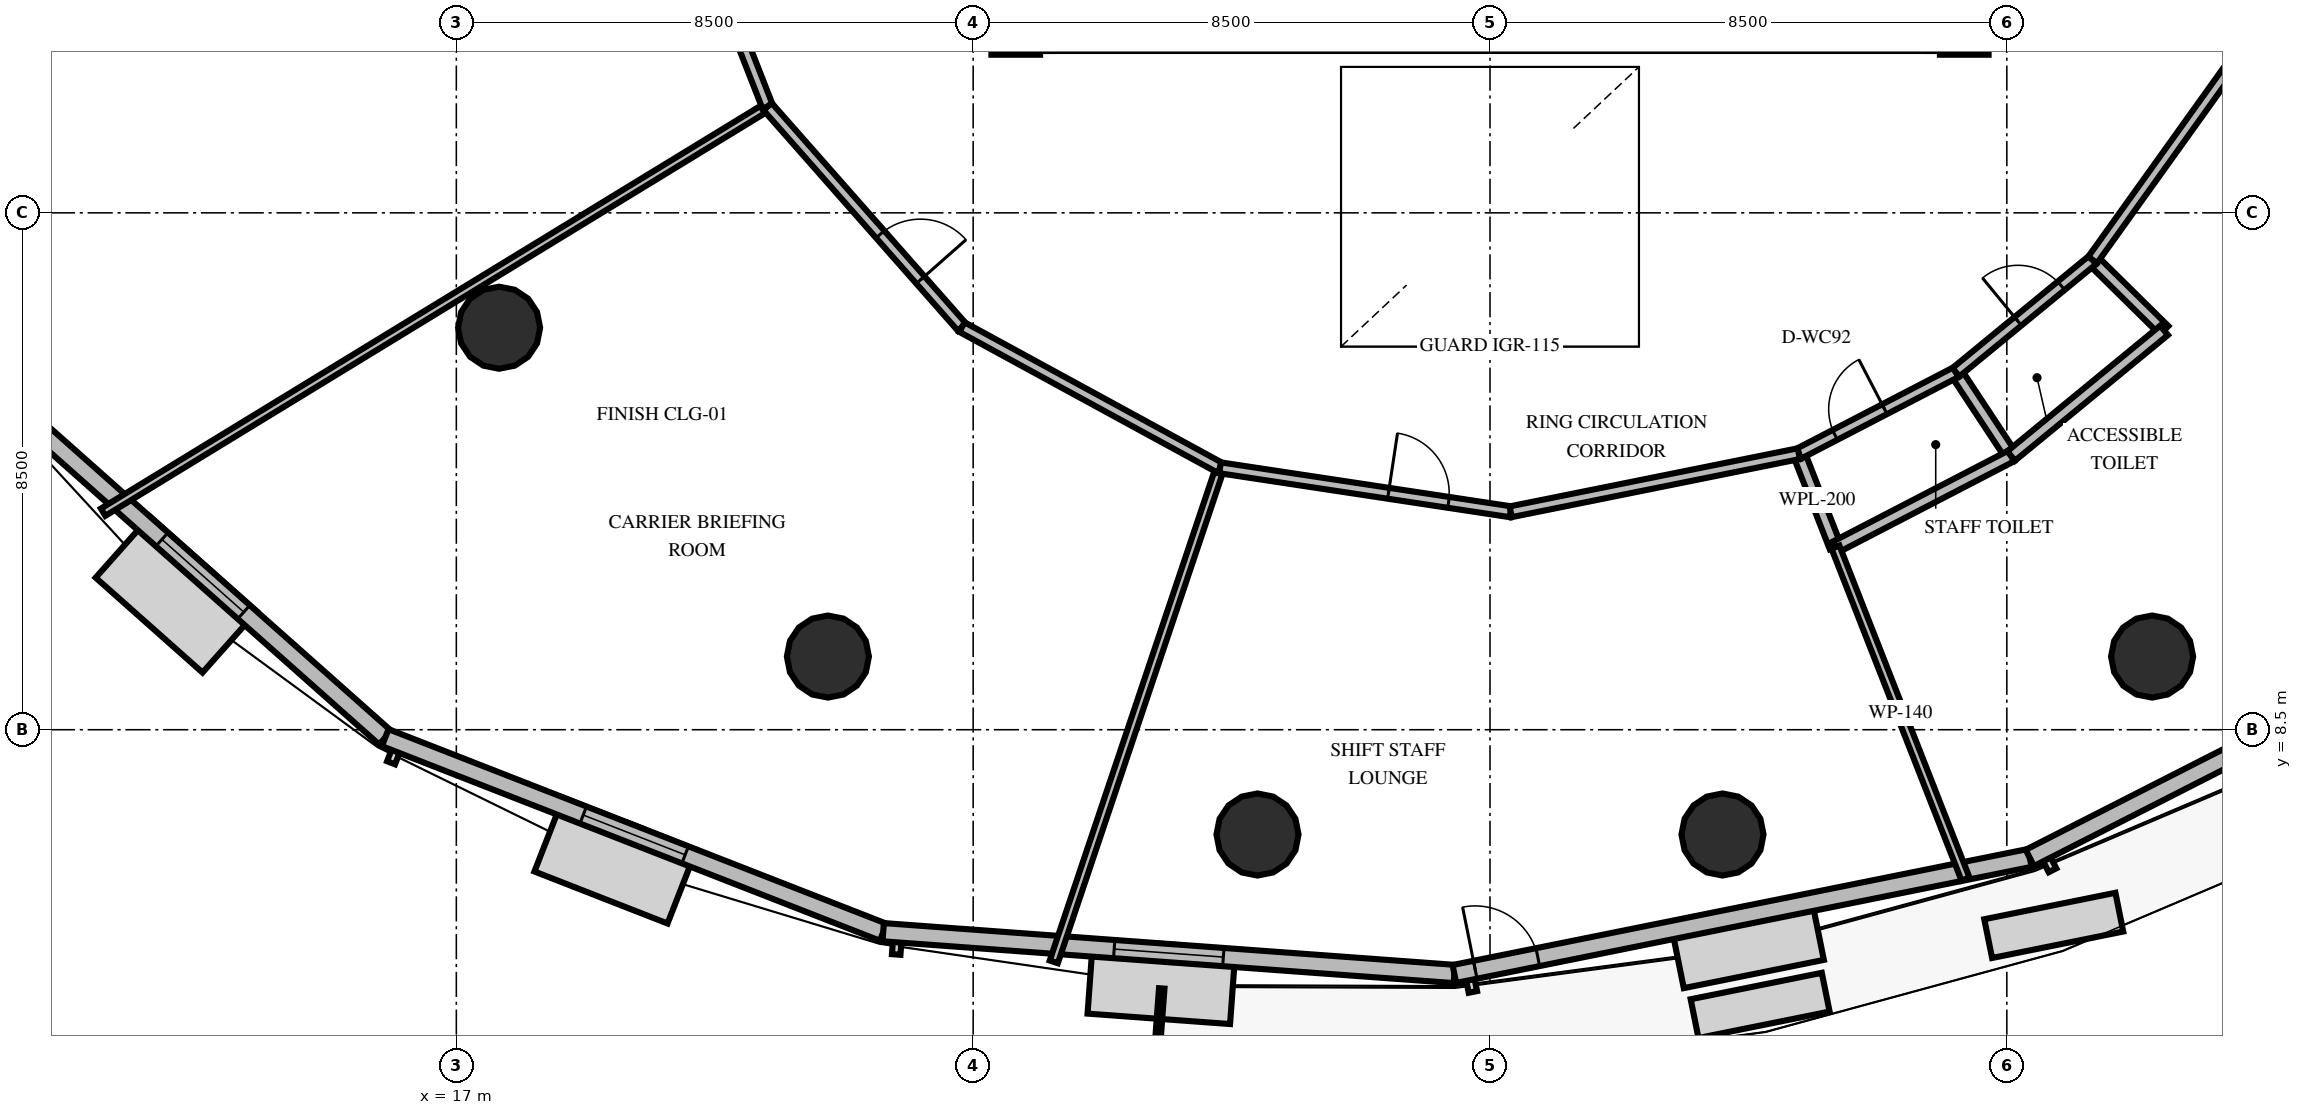
"""IFC4 building model, lengths in metres.
Left out: names, types, materials, properties, quantities, classifications, styles, units other than length and angle.
Written with IfcOpenShell. Run it as: python <this file> out.ifc"""

import sys

from ifc_helpers import new_model, si_unit, direction, frame, frame_2d, origin, origin_2d, place, context, subcontext, project, spatial, rectangle, circle, extrude, element, fill, save


model = new_model("IFC4")
c1 = context("Model", 3, precision=1e-05, world=origin(), true_north=direction((0.0, 1.0)))
c2 = subcontext(c1, "Body", "Model", "MODEL_VIEW")
j1 = project(units=[si_unit("LENGTHUNIT", "METRE"), si_unit("PLANEANGLEUNIT", "RADIAN")], contexts=[c1])
p1 = place(None, origin())
s1 = spatial("IfcSite", under=j1, at=p1, CompositionType="ELEMENT")
p2 = place(p1, origin())
s2 = spatial("IfcBuilding", under=s1, at=p2, CompositionType="ELEMENT")
p3 = place(p2, frame((0.0, 0.0, 80.4)))
s3 = spatial("IfcBuildingStorey", under=s2, at=p3, CompositionType="ELEMENT", Elevation=80.4)
for number, where, z_axis, x_axis in (
    (1, (26.2, 20.0, 0.0), (0.0, 0.0, 1.0), (1.0, 0.0, 0.0)),
    (2, (41.8, 20.0, 0.0), (0.0, 0.0, 1.0), (1.0, 0.0, 0.0)),
):
    element("IfcColumn", number, at=place(p3, frame(where, z_axis=z_axis, x_axis=x_axis)), inside=s3, PredefinedType="PILASTER", context=c2, shape_type="SweptSolid", body=[
        extrude(rectangle(XDim=0.8, YDim=0.8, at=origin_2d()), origin(), (0.0, 0.0, 1.0), 4.2),
    ])
for number, where, z_axis, x_axis in (
    (3, (17.703, 15.111, 0.0), (0.0, 0.0, 1.0), (1.0, 0.0, 0.0)),
    (4, (23.111, 9.703, 0.0), (0.0, 0.0, 1.0), (1.0, 0.0, 0.0)),
    (5, (30.176, 6.777, 0.0), (0.0, 0.0, 1.0), (1.0, 0.0, 0.0)),
    (6, (37.824, 6.777, 0.0), (0.0, 0.0, 1.0), (1.0, 0.0, 0.0)),
    (7, (44.889, 9.703, 0.0), (0.0, 0.0, 1.0), (1.0, 0.0, 0.0)),
):
    element("IfcColumn", number, at=place(p3, frame(where, z_axis=z_axis, x_axis=x_axis)), inside=s3, PredefinedType="COLUMN", context=c2, shape_type="SweptSolid", body=[
        extrude(circle(Radius=0.675, at=origin_2d()), origin(), (0.0, 0.0, 1.0), 4.2),
    ])
p4 = place(p3, frame((9.832, 13.695, 0.0), z_axis=(0.0, 0.0, 1.0), x_axis=(0.747787011146, -0.663938691418, 0.0)))
e8 = element("IfcWall", 8, at=p4, inside=s3, PredefinedType="SOLIDWALL", context=c2, shape_type="SweptSolid", body=[
    extrude(rectangle(XDim=8.022, YDim=0.3, at=frame_2d((4.011, 0.0))), origin(), (0.0, 0.0, 1.0), 3.0),
])
p5 = place(p4, frame((3.111, 0.0, 0.8)))
e9 = element("IfcOpeningElement", 9, at=p5, cuts=e8, PredefinedType="OPENING", context=c2, shape_type="SweptSolid", body=[
    extrude(rectangle(XDim=1.8, YDim=1.95, at=frame_2d((0.9, 0.975))), frame((0.0, 0.16, 0.0), z_axis=(0.0, -1.0, 0.0), x_axis=(1.0, 0.0, 0.0)), (0.0, 0.0, 1.0), 0.32),
])
p6 = place(p3, frame((15.83, 8.369, 0.0), z_axis=(0.0, 0.0, 1.0), x_axis=(0.931456467252, -0.363852785634, 0.0)))
e10 = element("IfcWall", 10, at=p6, inside=s3, PredefinedType="SOLIDWALL", context=c2, shape_type="SweptSolid", body=[
    extrude(rectangle(XDim=8.793, YDim=0.3, at=frame_2d((4.396, 0.0))), origin(), (0.0, 0.0, 1.0), 3.0),
])
p7 = place(p6, frame((3.496, 0.0, 0.8)))
e11 = element("IfcOpeningElement", 11, at=p7, cuts=e10, PredefinedType="OPENING", context=c2, shape_type="SweptSolid", body=[
    extrude(rectangle(XDim=1.8, YDim=1.95, at=frame_2d((0.9, 0.975))), frame((0.0, 0.16, 0.0), z_axis=(0.0, -1.0, 0.0), x_axis=(1.0, 0.0, 0.0)), (0.0, 0.0, 1.0), 0.32),
])
p8 = place(p3, frame((24.02, 5.17, 0.0), z_axis=(0.0, 0.0, 1.0), x_axis=(0.997338230912, -0.0729140121, 0.0)))
e12 = element("IfcWall", 12, at=p8, inside=s3, PredefinedType="SOLIDWALL", context=c2, shape_type="SweptSolid", body=[
    extrude(rectangle(XDim=9.419, YDim=0.3, at=frame_2d((4.709, 0.0))), origin(), (0.0, 0.0, 1.0), 3.0),
])
p9 = place(p8, frame((3.809, 0.0, 0.8)))
e13 = element("IfcOpeningElement", 13, at=p9, cuts=e12, PredefinedType="OPENING", context=c2, shape_type="SweptSolid", body=[
    extrude(rectangle(XDim=1.8, YDim=1.95, at=frame_2d((0.9, 0.975))), frame((0.0, 0.16, 0.0), z_axis=(0.0, -1.0, 0.0), x_axis=(1.0, 0.0, 0.0)), (0.0, 0.0, 1.0), 0.32),
])
p10 = place(p3, frame((33.414, 4.483, 0.0), z_axis=(0.0, 0.0, 1.0), x_axis=(0.980274098215, 0.197642840418, 0.0)))
e14 = element("IfcWall", 14, at=p10, inside=s3, PredefinedType="SOLIDWALL", context=c2, shape_type="SweptSolid", body=[
    extrude(rectangle(XDim=9.655, YDim=0.3, at=frame_2d((4.827, 0.0))), origin(), (0.0, 0.0, 1.0), 3.0),
])
p11 = place(p10, frame((0.35, 0.0, 0.0)))
e15 = element("IfcOpeningElement", 15, at=p11, cuts=e14, PredefinedType="OPENING", context=c2, shape_type="SweptSolid", body=[
    extrude(rectangle(XDim=1.05, YDim=2.15, at=frame_2d((0.525, 1.075))), frame((0.0, 0.16, 0.0), z_axis=(0.0, -1.0, 0.0), x_axis=(1.0, 0.0, 0.0)), (0.0, 0.0, 1.0), 0.32),
])
p12 = place(p3, frame((42.878, 6.392, 0.0), z_axis=(0.0, 0.0, 1.0), x_axis=(0.891142535662, 0.453723463284, 0.0)))
e16 = element("IfcWall", 16, at=p12, inside=s3, PredefinedType="SOLIDWALL", context=c2, shape_type="SweptSolid", body=[
    extrude(rectangle(XDim=9.419, YDim=0.3, at=frame_2d((4.709, 0.0))), origin(), (0.0, 0.0, 1.0), 3.0),
])
p13 = place(p12, frame((3.809, 0.0, 0.8)))
e17 = element("IfcOpeningElement", 17, at=p13, cuts=e16, PredefinedType="OPENING", context=c2, shape_type="SweptSolid", body=[
    extrude(rectangle(XDim=1.8, YDim=1.95, at=frame_2d((0.9, 0.975))), frame((0.0, 0.16, 0.0), z_axis=(0.0, -1.0, 0.0), x_axis=(1.0, 0.0, 0.0)), (0.0, 0.0, 1.0), 0.32),
])
for number, where, z_axis, x_axis in (
    (18, (39.079, 13.04, 0.0), (0.0, 0.0, 1.0), (0.365, -0.931, 0.0)),
    (19, (41.663, 14.379, 0.0), (0.0, 0.0, 1.0), (0.551, -0.835, 0.0)),
):
    element("IfcWall", number, at=place(p3, frame(where, z_axis=z_axis, x_axis=x_axis)), inside=s3, PredefinedType="PLUMBINGWALL", context=c2, shape_type="SweptSolid", body=[
        extrude(rectangle(XDim=1.65, YDim=0.2, at=frame_2d((0.825, 0.0))), origin(), (0.0, 0.0, 1.0), 3.0),
    ])
p14 = place(p3, frame((39.681, 11.503, 0.0), z_axis=(0.0, 0.0, 1.0), x_axis=(0.88780674382, 0.46021645519, 0.0)))
e20 = element("IfcWall", 20, at=p14, inside=s3, PredefinedType="PLUMBINGWALL", context=c2, shape_type="SweptSolid", body=[
    extrude(rectangle(XDim=3.255, YDim=0.2, at=frame_2d((1.627, 0.0))), origin(), (0.0, 0.0, 1.0), 3.0),
])
p15 = place(p3, frame((39.079, 13.04, 0.0), z_axis=(0.0, 0.0, 1.0), x_axis=(0.887821822761, 0.460187365134, 0.0)))
e21 = element("IfcWall", 21, at=p15, inside=s3, PredefinedType="PARTITIONING", context=c2, shape_type="SweptSolid", body=[
    extrude(rectangle(XDim=2.91, YDim=0.18, at=frame_2d((1.455, 0.0))), origin(), (0.0, 0.0, 1.0), 3.0),
])
p16 = place(p15, frame((0.669, 0.0, 0.0)))
e22 = element("IfcOpeningElement", 22, at=p16, cuts=e21, PredefinedType="OPENING", context=c2, shape_type="SweptSolid", body=[
    extrude(rectangle(XDim=0.92, YDim=2.1, at=frame_2d((0.46, 1.05))), frame((0.0, 0.1, 0.0), z_axis=(0.0, -1.0, 0.0), x_axis=(1.0, 0.0, 0.0)), (0.0, 0.0, 1.0), 0.2),
])
p17 = place(p3, frame((43.911, 16.226, 0.0), z_axis=(0.0, 0.0, 1.0), x_axis=(0.711972528302, -0.702207319061, 0.0)))
e23 = element("IfcWall", 23, at=p17, inside=s3, PredefinedType="PLUMBINGWALL", context=c2, shape_type="SweptSolid", body=[
    extrude(rectangle(XDim=1.65, YDim=0.2, at=frame_2d((0.825, 0.0))), origin(), (0.0, 0.0, 1.0), 3.0),
])
p18 = place(p3, frame((42.571, 13.001, 0.0), z_axis=(0.0, 0.0, 1.0), x_axis=(0.772739393732, 0.634723427466, 0.0)))
e24 = element("IfcWall", 24, at=p18, inside=s3, PredefinedType="PLUMBINGWALL", context=c2, shape_type="SweptSolid", body=[
    extrude(rectangle(XDim=3.255, YDim=0.2, at=frame_2d((1.627, 0.0))), origin(), (0.0, 0.0, 1.0), 3.0),
])
p19 = place(p3, frame((41.663, 14.379, 0.0), z_axis=(0.0, 0.0, 1.0), x_axis=(0.772733602253, 0.634730478194, 0.0)))
e25 = element("IfcWall", 25, at=p19, inside=s3, PredefinedType="PARTITIONING", context=c2, shape_type="SweptSolid", body=[
    extrude(rectangle(XDim=2.91, YDim=0.18, at=frame_2d((1.455, 0.0))), origin(), (0.0, 0.0, 1.0), 3.0),
])
p20 = place(p19, frame((1.321, 0.0, 0.0)))
e26 = element("IfcOpeningElement", 26, at=p20, cuts=e25, PredefinedType="OPENING", context=c2, shape_type="SweptSolid", body=[
    extrude(rectangle(XDim=0.92, YDim=2.1, at=frame_2d((0.46, 1.05))), frame((0.0, 0.1, 0.0), z_axis=(0.0, -1.0, 0.0), x_axis=(1.0, 0.0, 0.0)), (0.0, 0.0, 1.0), 0.2),
])
p21 = place(p3, frame((39.681, 11.503, 0.0), z_axis=(0.0, 0.0, 1.0), x_axis=(0.364892232806, -0.931049761526, 0.0)))
e27 = element("IfcWall", 27, at=p21, inside=s3, PredefinedType="PARTITIONING", context=c2, shape_type="SweptSolid", body=[
    extrude(rectangle(XDim=5.864, YDim=0.14, at=frame_2d((2.932, 0.0))), origin(), (0.0, 0.0, 1.0), 3.0),
])
p22 = place(p3, frame((43.911, 16.226, 0.0), z_axis=(0.0, 0.0, 1.0), x_axis=(0.582128747438, 0.813096624889, 0.0)))
e28 = element("IfcWall", 28, at=p22, inside=s3, PredefinedType="PARTITIONING", context=c2, shape_type="SweptSolid", body=[
    extrude(rectangle(XDim=4.355, YDim=0.18, at=frame_2d((2.177, 0.0))), origin(), (0.0, 0.0, 1.0), 3.0),
])
p23 = place(p3, frame((22.119, 18.748, 0.0), z_axis=(0.0, 0.0, 1.0), x_axis=(-0.853550884502, -0.52100948894, 0.0)))
e29 = element("IfcWall", 29, at=p23, inside=s3, PredefinedType="PARTITIONING", context=c2, shape_type="SweptSolid", body=[
    extrude(rectangle(XDim=12.802, YDim=0.14, at=frame_2d((6.401, 0.0))), origin(), (0.0, 0.0, 1.0), 3.0),
])
p24 = place(p3, frame((20.354, 23.249, 0.0), z_axis=(0.0, 0.0, 1.0), x_axis=(0.364921025816, -0.931038476604, 0.0)))
e30 = element("IfcWall", 30, at=p24, inside=s3, PredefinedType="PARTITIONING", context=c2, shape_type="SweptSolid", body=[
    extrude(rectangle(XDim=4.834, YDim=0.18, at=frame_2d((2.417, 0.0))), origin(), (0.0, 0.0, 1.0), 3.0),
])
p25 = place(p24, frame((1.842, 0.0, 0.0)))
e31 = element("IfcOpeningElement", 31, at=p25, cuts=e30, PredefinedType="OPENING", context=c2, shape_type="SweptSolid", body=[
    extrude(rectangle(XDim=1.15, YDim=2.15, at=frame_2d((0.575, 1.075))), frame((0.0, 0.1, 0.0), z_axis=(0.0, -1.0, 0.0), x_axis=(1.0, 0.0, 0.0)), (0.0, 0.0, 1.0), 0.2),
])
p26 = place(p3, frame((29.56, 12.807, 0.0), z_axis=(0.0, 0.0, 1.0), x_axis=(-0.318960399163, -0.947768043229, 0.0)))
e32 = element("IfcWall", 32, at=p26, inside=s3, PredefinedType="PARTITIONING", context=c2, shape_type="SweptSolid", body=[
    extrude(rectangle(XDim=8.573, YDim=0.14, at=frame_2d((4.286, 0.0))), origin(), (0.0, 0.0, 1.0), 3.0),
])
p27 = place(p3, frame((22.119, 18.748, 0.0), z_axis=(0.0, 0.0, 1.0), x_axis=(0.661295879948, -0.750125162332, 0.0)))
e33 = element("IfcWall", 33, at=p27, inside=s3, PredefinedType="PARTITIONING", context=c2, shape_type="SweptSolid", body=[
    extrude(rectangle(XDim=4.834, YDim=0.18, at=frame_2d((2.417, 0.0))), origin(), (0.0, 0.0, 1.0), 3.0),
])
p28 = place(p27, frame((2.801, 0.0, 0.0)))
e34 = element("IfcOpeningElement", 34, at=p28, cuts=e33, PredefinedType="OPENING", context=c2, shape_type="SweptSolid", body=[
    extrude(rectangle(XDim=1.0, YDim=2.15, at=frame_2d((0.5, 1.075))), frame((0.0, 0.1, 0.0), z_axis=(0.0, -1.0, 0.0), x_axis=(1.0, 0.0, 0.0)), (0.0, 0.0, 1.0), 0.2),
])
p29 = place(p3, frame((25.316, 15.121, 0.0), z_axis=(0.0, 0.0, 1.0), x_axis=(0.877995916426, -0.478668121708, 0.0)))
e35 = element("IfcWall", 35, at=p29, inside=s3, PredefinedType="PARTITIONING", context=c2, shape_type="SweptSolid", body=[
    extrude(rectangle(XDim=4.834, YDim=0.18, at=frame_2d((2.417, 0.0))), origin(), (0.0, 0.0, 1.0), 3.0),
])
p30 = place(p3, frame((29.56, 12.807, 0.0), z_axis=(0.0, 0.0, 1.0), x_axis=(0.988756719699, -0.149533104195, 0.0)))
e36 = element("IfcWall", 36, at=p30, inside=s3, PredefinedType="PARTITIONING", context=c2, shape_type="SweptSolid", body=[
    extrude(rectangle(XDim=4.834, YDim=0.18, at=frame_2d((2.417, 0.0))), origin(), (0.0, 0.0, 1.0), 3.0),
])
p31 = place(p30, frame((2.801, 0.0, 0.0)))
e37 = element("IfcOpeningElement", 37, at=p31, cuts=e36, PredefinedType="OPENING", context=c2, shape_type="SweptSolid", body=[
    extrude(rectangle(XDim=1.0, YDim=2.15, at=frame_2d((0.5, 1.075))), frame((0.0, 0.1, 0.0), z_axis=(0.0, -1.0, 0.0), x_axis=(1.0, 0.0, 0.0)), (0.0, 0.0, 1.0), 0.2),
])
p32 = place(p3, frame((34.34, 12.084, 0.0), z_axis=(0.0, 0.0, 1.0), x_axis=(0.980270628178, 0.197660050419, 0.0)))
e38 = element("IfcWall", 38, at=p32, inside=s3, PredefinedType="PARTITIONING", context=c2, shape_type="SweptSolid", body=[
    extrude(rectangle(XDim=4.834, YDim=0.18, at=frame_2d((2.417, 0.0))), origin(), (0.0, 0.0, 1.0), 3.0),
])
p33 = place(p5, origin())
e39 = element("IfcWindow", 39, at=p33, inside=s3, PartitioningType="SINGLE_PANEL", PredefinedType="WINDOW", context=c2, shape_type="SweptSolid", body=[
    extrude(rectangle(XDim=1.8, YDim=1.95, at=frame_2d((0.9, 0.975))), frame((0.0, 0.03, 0.0), z_axis=(0.0, -1.0, 0.0), x_axis=(1.0, 0.0, 0.0)), (0.0, 0.0, 1.0), 0.06),
])
fill(e9, e39)
p34 = place(p7, origin())
e40 = element("IfcWindow", 40, at=p34, inside=s3, PartitioningType="SINGLE_PANEL", PredefinedType="WINDOW", context=c2, shape_type="SweptSolid", body=[
    extrude(rectangle(XDim=1.8, YDim=1.95, at=frame_2d((0.9, 0.975))), frame((0.0, 0.03, 0.0), z_axis=(0.0, -1.0, 0.0), x_axis=(1.0, 0.0, 0.0)), (0.0, 0.0, 1.0), 0.06),
])
fill(e11, e40)
p35 = place(p9, origin())
e41 = element("IfcWindow", 41, at=p35, inside=s3, PartitioningType="SINGLE_PANEL", PredefinedType="WINDOW", context=c2, shape_type="SweptSolid", body=[
    extrude(rectangle(XDim=1.8, YDim=1.95, at=frame_2d((0.9, 0.975))), frame((0.0, 0.03, 0.0), z_axis=(0.0, -1.0, 0.0), x_axis=(1.0, 0.0, 0.0)), (0.0, 0.0, 1.0), 0.06),
])
fill(e13, e41)
p36 = place(p11, origin())
e42 = element("IfcDoor", 42, at=p36, inside=s3, OperationType="SINGLE_SWING_LEFT", PredefinedType="DOOR", context=c2, shape_type="SweptSolid", body=[
    extrude(rectangle(XDim=1.05, YDim=2.15, at=frame_2d((0.525, 1.075))), frame((0.0, 0.025, 0.0), z_axis=(0.0, -1.0, 0.0), x_axis=(1.0, 0.0, 0.0)), (0.0, 0.0, 1.0), 0.05),
])
fill(e15, e42)
p37 = place(p16, origin())
e43 = element("IfcDoor", 43, at=p37, inside=s3, OperationType="SINGLE_SWING_RIGHT", PredefinedType="DOOR", context=c2, shape_type="SweptSolid", body=[
    extrude(rectangle(XDim=0.92, YDim=2.1, at=frame_2d((0.46, 1.05))), frame((0.0, 0.025, 0.0), z_axis=(0.0, -1.0, 0.0), x_axis=(1.0, 0.0, 0.0)), (0.0, 0.0, 1.0), 0.05),
])
fill(e22, e43)
p38 = place(p20, origin())
e44 = element("IfcDoor", 44, at=p38, inside=s3, OperationType="SINGLE_SWING_LEFT", PredefinedType="DOOR", context=c2, shape_type="SweptSolid", body=[
    extrude(rectangle(XDim=0.92, YDim=2.1, at=frame_2d((0.46, 1.05))), frame((0.0, 0.025, 0.0), z_axis=(0.0, -1.0, 0.0), x_axis=(1.0, 0.0, 0.0)), (0.0, 0.0, 1.0), 0.05),
])
fill(e26, e44)
p39 = place(p28, origin())
e45 = element("IfcDoor", 45, at=p39, inside=s3, OperationType="SINGLE_SWING_RIGHT", PredefinedType="DOOR", context=c2, shape_type="SweptSolid", body=[
    extrude(rectangle(XDim=1.0, YDim=2.15, at=frame_2d((0.5, 1.075))), frame((0.0, 0.025, 0.0), z_axis=(0.0, -1.0, 0.0), x_axis=(1.0, 0.0, 0.0)), (0.0, 0.0, 1.0), 0.05),
])
fill(e34, e45)
p40 = place(p31, origin())
e46 = element("IfcDoor", 46, at=p40, inside=s3, OperationType="SINGLE_SWING_LEFT", PredefinedType="DOOR", context=c2, shape_type="SweptSolid", body=[
    extrude(rectangle(XDim=1.0, YDim=2.15, at=frame_2d((0.5, 1.075))), frame((0.0, 0.025, 0.0), z_axis=(0.0, -1.0, 0.0), x_axis=(1.0, 0.0, 0.0)), (0.0, 0.0, 1.0), 0.05),
])
fill(e37, e46)
save(model, sys.argv[1])
